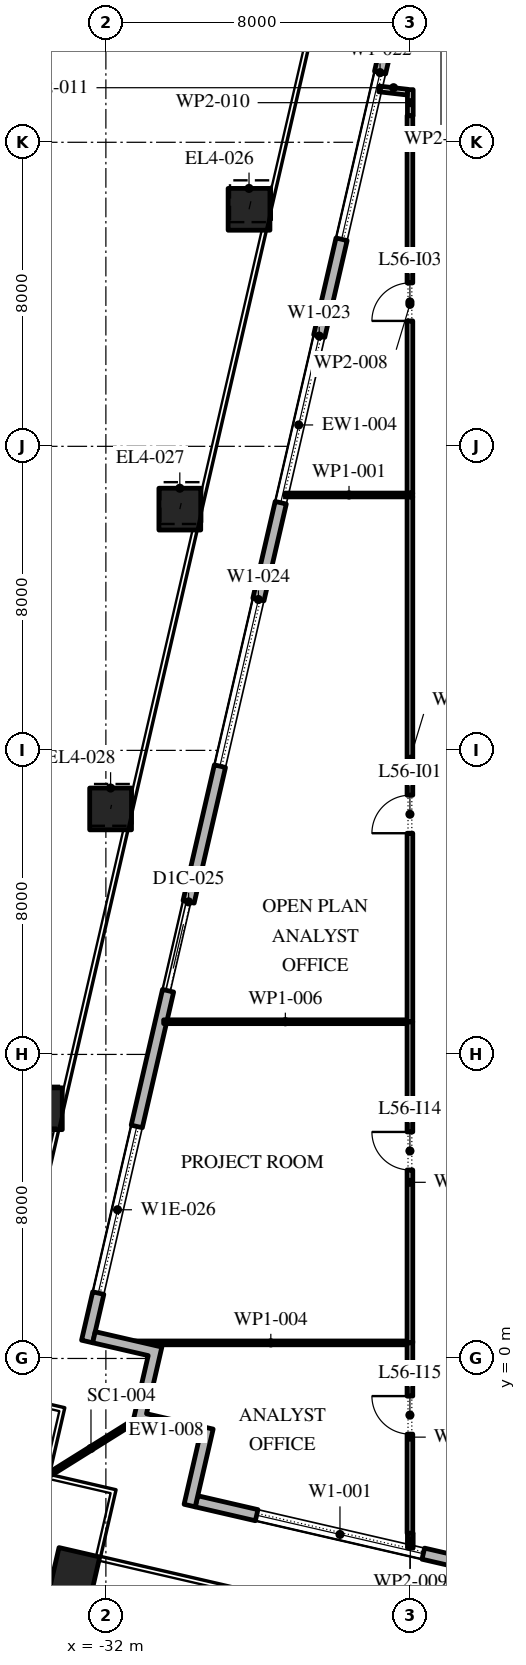
"""IFC4 building model, lengths in metres.
Left out: names, types, materials, properties, quantities, classifications, styles, units other than length and angle.
Written with IfcOpenShell. Run it as: python <this file> out.ifc"""

import sys

from ifc_helpers import new_model, si_unit, direction, frame, frame_2d, origin, origin_2d, place, context, subcontext, project, spatial, polyline, rectangle, outline, extrude, element, fill, save


model = new_model("IFC4")
c1 = context("Model", 3, precision=1e-05, world=origin(), true_north=direction((0.0, 1.0)))
c2 = subcontext(c1, "Body", "Model", "MODEL_VIEW")
j1 = project(units=[si_unit("LENGTHUNIT", "METRE"), si_unit("PLANEANGLEUNIT", "RADIAN")], contexts=[c1])
p1 = place(None, origin())
s1 = spatial("IfcSite", under=j1, at=p1, CompositionType="ELEMENT")
p2 = place(p1, origin())
s2 = spatial("IfcBuilding", under=s1, at=p2, CompositionType="ELEMENT")
p3 = place(p2, frame((0.0, 0.0, 259.8)))
s3 = spatial("IfcBuildingStorey", under=s2, at=p3, CompositionType="ELEMENT", Elevation=259.8)
p4 = place(p3, frame((-32.821, -5.635, 0.0), z_axis=(0.0, 0.0, 1.0), x_axis=(0.974370064785, -0.224951054344, 0.0)))
e1 = element("IfcColumn", 1, at=p4, inside=s3, PredefinedType="COLUMN", context=c2, shape_type="SweptSolid", body=[
    extrude(rectangle(XDim=1.1, YDim=1.1, at=origin_2d()), origin(), (0.0, 0.0, 1.0), 4.2),
])
p5 = place(p3, frame((-28.233, 30.236, 0.0), z_axis=(0.011668267153, 0.050562490995, 0.998652735462), x_axis=(-0.974391195695, 0.224859506699, 0.0)))
e2 = element("IfcColumn", 2, at=p5, inside=s3, PredefinedType="COLUMN", context=c2, shape_type="SweptSolid", body=[
    extrude(rectangle(XDim=1.1, YDim=1.1, at=origin_2d()), origin(), (0.0, 0.0, 1.0), 4.206),
])
p6 = place(p3, frame((-30.055, 22.348, 0.0), z_axis=(0.008770904004, 0.037871717951, 0.999244116431), x_axis=(-0.974214614928, 0.225623323396, 0.0)))
e3 = element("IfcColumn", 3, at=p6, inside=s3, PredefinedType="COLUMN", context=c2, shape_type="SweptSolid", body=[
    extrude(rectangle(XDim=1.1, YDim=1.1, at=origin_2d()), origin(), (0.0, 0.0, 1.0), 4.203),
])
p7 = place(p3, frame((-31.876, 14.459, 0.0), z_axis=(0.005869091843, 0.025277771797, 0.999663237302), x_axis=(-0.974088391429, 0.226167649504, 0.0)))
e4 = element("IfcColumn", 4, at=p7, inside=s3, PredefinedType="COLUMN", context=c2, shape_type="SweptSolid", body=[
    extrude(rectangle(XDim=1.1, YDim=1.1, at=origin_2d()), origin(), (0.0, 0.0, 1.0), 4.201),
])
p8 = place(p3, frame((-33.697, 6.571, 0.0), z_axis=(0.002964348167, 0.012671135303, 0.9999153239), x_axis=(-0.973709261374, 0.227794368487, 0.0)))
e5 = element("IfcColumn", 5, at=p8, inside=s3, PredefinedType="COLUMN", context=c2, shape_type="SweptSolid", body=[
    extrude(rectangle(XDim=1.1, YDim=1.1, at=origin_2d()), origin(), (0.0, 0.0, 1.0), 4.2),
])
p9 = place(p3, frame((-29.616, -3.758, 0.0), z_axis=(0.0, 0.0, 1.0), x_axis=(0.974370532314, -0.224949029246, 0.0)))
e6 = element("IfcWall", 6, at=p9, inside=s3, PredefinedType="STANDARD", context=c2, shape_type="SweptSolid", body=[
    extrude(rectangle(XDim=48.0, YDim=0.3, at=frame_2d((24.0, 0.0))), origin(), (0.0, 0.0, 1.0), 4.0),
])
p10 = place(p9, frame((1.625, 0.0, 0.45)))
e7 = element("IfcOpeningElement", 7, at=p10, cuts=e6, PredefinedType="OPENING", context=c2, shape_type="SweptSolid", body=[
    extrude(rectangle(XDim=4.5, YDim=3.05, at=frame_2d((2.25, 1.525))), frame((0.0, 0.16, 0.0), z_axis=(0.0, -1.0, 0.0), x_axis=(1.0, 0.0, 0.0)), (0.0, 0.0, 1.0), 0.32),
])
p11 = place(p9, frame((10.575, 0.0, 0.0)))
e8 = element("IfcOpeningElement", 8, at=p11, cuts=e6, PredefinedType="OPENING", context=c2, shape_type="SweptSolid", body=[
    extrude(rectangle(XDim=2.4, YDim=3.5, at=frame_2d((1.2, 1.75))), frame((0.0, 0.16, 0.0), z_axis=(0.0, -1.0, 0.0), x_axis=(1.0, 0.0, 0.0)), (0.0, 0.0, 1.0), 0.32),
])
p12 = place(p9, frame((17.575, 0.0, 0.45)))
e9 = element("IfcOpeningElement", 9, at=p12, cuts=e6, PredefinedType="OPENING", context=c2, shape_type="SweptSolid", body=[
    extrude(rectangle(XDim=4.5, YDim=3.0, at=frame_2d((2.25, 1.5))), frame((0.0, 0.16, 0.0), z_axis=(0.0, -1.0, 0.0), x_axis=(1.0, 0.0, 0.0)), (0.0, 0.0, 1.0), 0.32),
])
p13 = place(p9, frame((25.625, 0.0, 0.45)))
e10 = element("IfcOpeningElement", 10, at=p13, cuts=e6, PredefinedType="OPENING", context=c2, shape_type="SweptSolid", body=[
    extrude(rectangle(XDim=4.5, YDim=2.95, at=frame_2d((2.25, 1.475))), frame((0.0, 0.16, 0.0), z_axis=(0.0, -1.0, 0.0), x_axis=(1.0, 0.0, 0.0)), (0.0, 0.0, 1.0), 0.32),
])
p14 = place(p9, frame((33.675, 0.0, 0.45)))
e11 = element("IfcOpeningElement", 11, at=p14, cuts=e6, PredefinedType="OPENING", context=c2, shape_type="SweptSolid", body=[
    extrude(rectangle(XDim=4.5, YDim=2.825, at=frame_2d((2.25, 1.413))), frame((0.0, 0.16, 0.0), z_axis=(0.0, -1.0, 0.0), x_axis=(1.0, 0.0, 0.0)), (0.0, 0.0, 1.0), 0.32),
])
p15 = place(p9, frame((42.775, 0.0, 0.0)))
e12 = element("IfcOpeningElement", 12, at=p15, cuts=e6, PredefinedType="OPENING", context=c2, shape_type="SweptSolid", body=[
    extrude(rectangle(XDim=2.4, YDim=3.5, at=frame_2d((1.2, 1.75))), frame((0.0, 0.16, 0.0), z_axis=(0.0, -1.0, 0.0), x_axis=(1.0, 0.0, 0.0)), (0.0, 0.0, 1.0), 0.32),
])
p16 = place(p3, frame((-21.359, 48.678, 0.0), z_axis=(0.0, 0.0, 1.0), x_axis=(-0.224949198343, -0.974370493275, 0.0)))
e13 = element("IfcWall", 13, at=p16, inside=s3, PredefinedType="STANDARD", context=c2, shape_type="SweptSolid", body=[
    extrude(rectangle(XDim=49.5, YDim=0.3, at=frame_2d((24.75, 0.0))), origin(), (0.0, 0.0, 1.0), 4.0),
])
p17 = place(p16, frame((1.157, 0.0, 0.45)))
e14 = element("IfcOpeningElement", 14, at=p17, cuts=e13, PredefinedType="OPENING", context=c2, shape_type="SweptSolid", body=[
    extrude(rectangle(XDim=4.5, YDim=3.05, at=frame_2d((2.25, 1.525))), frame((0.0, 0.16, 0.0), z_axis=(0.0, -1.0, 0.0), x_axis=(1.0, 0.0, 0.0)), (0.0, 0.0, 1.0), 0.32),
])
p18 = place(p16, frame((9.171, 0.0, 0.0)))
e15 = element("IfcOpeningElement", 15, at=p18, cuts=e13, PredefinedType="OPENING", context=c2, shape_type="SweptSolid", body=[
    extrude(rectangle(XDim=2.4, YDim=3.5, at=frame_2d((1.2, 1.75))), frame((0.0, 0.16, 0.0), z_axis=(0.0, -1.0, 0.0), x_axis=(1.0, 0.0, 0.0)), (0.0, 0.0, 1.0), 0.32),
])
p19 = place(p16, frame((15.236, 0.0, 0.45)))
e16 = element("IfcOpeningElement", 16, at=p19, cuts=e13, PredefinedType="OPENING", context=c2, shape_type="SweptSolid", body=[
    extrude(rectangle(XDim=4.5, YDim=3.05, at=frame_2d((2.25, 1.525))), frame((0.0, 0.16, 0.0), z_axis=(0.0, -1.0, 0.0), x_axis=(1.0, 0.0, 0.0)), (0.0, 0.0, 1.0), 0.32),
])
p20 = place(p16, frame((22.35, 0.0, 0.45)))
e17 = element("IfcOpeningElement", 17, at=p20, cuts=e13, PredefinedType="OPENING", context=c2, shape_type="SweptSolid", body=[
    extrude(rectangle(XDim=4.5, YDim=3.05, at=frame_2d((2.25, 1.525))), frame((0.0, 0.16, 0.0), z_axis=(0.0, -1.0, 0.0), x_axis=(1.0, 0.0, 0.0)), (0.0, 0.0, 1.0), 0.32),
])
p21 = place(p16, frame((29.464, 0.0, 0.45)))
e18 = element("IfcOpeningElement", 18, at=p21, cuts=e13, PredefinedType="OPENING", context=c2, shape_type="SweptSolid", body=[
    extrude(rectangle(XDim=4.5, YDim=3.05, at=frame_2d((2.25, 1.525))), frame((0.0, 0.16, 0.0), z_axis=(0.0, -1.0, 0.0), x_axis=(1.0, 0.0, 0.0)), (0.0, 0.0, 1.0), 0.32),
])
p22 = place(p16, frame((37.628, 0.0, 0.0)))
e19 = element("IfcOpeningElement", 19, at=p22, cuts=e13, PredefinedType="OPENING", context=c2, shape_type="SweptSolid", body=[
    extrude(rectangle(XDim=2.4, YDim=3.325, at=frame_2d((1.2, 1.663))), frame((0.0, 0.16, 0.0), z_axis=(0.0, -1.0, 0.0), x_axis=(1.0, 0.0, 0.0)), (0.0, 0.0, 1.0), 0.32),
])
p23 = place(p16, frame((43.693, 0.0, 0.45)))
e20 = element("IfcOpeningElement", 20, at=p23, cuts=e13, PredefinedType="OPENING", context=c2, shape_type="SweptSolid", body=[
    extrude(rectangle(XDim=4.5, YDim=2.825, at=frame_2d((2.25, 1.413))), frame((0.0, 0.16, 0.0), z_axis=(0.0, -1.0, 0.0), x_axis=(1.0, 0.0, 0.0)), (0.0, 0.0, 1.0), 0.32),
])
p24 = place(p3, origin())
e21 = element("IfcWall", 21, at=p24, inside=s3, PredefinedType="STANDARD", context=c2, shape_type="SweptSolid", body=[
    extrude(outline(polyline([(-31.291, -1.678), (-30.886, 0.076), (-32.348, 0.413), (-32.28, 0.705), (-30.526, 0.301), (-30.931, -1.453), (-29.177, -1.858), (-29.65, -3.905), (-29.942, -3.837), (-29.537, -2.083), (-31.291, -1.678)])), origin(), (0.0, 0.0, 1.0), 4.0),
])
p25 = place(p3, frame((-31.291, -1.678, -0.05), z_axis=(0.0, 0.0, 1.0), x_axis=(-0.84807753525, -0.529872148923, 0.0)))
e22 = element("IfcWall", 22, at=p25, inside=s3, PredefinedType="STANDARD", context=c2, shape_type="SweptSolid", body=[
    extrude(rectangle(XDim=2.596, YDim=0.1, at=frame_2d((1.298, 0.0))), origin(), (0.0, 0.0, 1.0), 4.05),
])
p26 = place(p3, frame((-27.28, 22.72, 0.0), z_axis=(0.0, 0.0, 1.0), x_axis=(1.0, 0.0, 0.0)))
e23 = element("IfcWall", 23, at=p26, inside=s3, PredefinedType="PARTITIONING", context=c2, shape_type="SweptSolid", body=[
    extrude(rectangle(XDim=3.355, YDim=0.1, at=frame_2d((1.677, 0.0))), origin(), (0.0, 0.0, 1.0), 4.0),
])
p27 = place(p3, frame((-24.0, -4.6, 0.0), z_axis=(0.0, 0.0, 1.0), x_axis=(0.0, 1.0, 0.0)))
e24 = element("IfcWall", 24, at=p27, inside=s3, PredefinedType="PARTITIONING", context=c2, shape_type="SweptSolid", body=[
    extrude(rectangle(XDim=5.06, YDim=0.15, at=frame_2d((2.53, 0.0))), origin(), (0.0, 0.0, 1.0), 4.0),
])
p28 = place(p27, frame((2.61, 0.0, 0.0)))
e25 = element("IfcOpeningElement", 25, at=p28, cuts=e24, PredefinedType="OPENING", context=c2, shape_type="SweptSolid", body=[
    extrude(rectangle(XDim=1.0, YDim=2.1, at=frame_2d((0.5, 1.05))), frame((0.0, 0.085, 0.0), z_axis=(0.0, -1.0, 0.0), x_axis=(1.0, 0.0, 0.0)), (0.0, 0.0, 1.0), 0.17),
])
p29 = place(p3, frame((-24.075, 0.41, 0.0), z_axis=(0.0, 0.0, 1.0), x_axis=(-1.0, 0.0, 0.0)))
e26 = element("IfcWall", 26, at=p29, inside=s3, PredefinedType="PARTITIONING", context=c2, shape_type="SweptSolid", body=[
    extrude(rectangle(XDim=7.17, YDim=0.1, at=frame_2d((3.585, 0.0))), origin(), (0.0, 0.0, 1.0), 4.0),
])
p30 = place(p3, frame((-24.0, 0.41, 0.0), z_axis=(0.0, 0.0, 1.0), x_axis=(0.0, 1.0, 0.0)))
e27 = element("IfcWall", 27, at=p30, inside=s3, PredefinedType="PARTITIONING", context=c2, shape_type="SweptSolid", body=[
    extrude(rectangle(XDim=8.45, YDim=0.15, at=frame_2d((4.225, 0.0))), origin(), (0.0, 0.0, 1.0), 4.0),
])
p31 = place(p30, frame((4.55, 0.0, 0.0)))
e28 = element("IfcOpeningElement", 28, at=p31, cuts=e27, PredefinedType="OPENING", context=c2, shape_type="SweptSolid", body=[
    extrude(rectangle(XDim=1.0, YDim=2.1, at=frame_2d((0.5, 1.05))), frame((0.0, 0.085, 0.0), z_axis=(0.0, -1.0, 0.0), x_axis=(1.0, 0.0, 0.0)), (0.0, 0.0, 1.0), 0.17),
])
p32 = place(p3, frame((-24.075, 8.86, 0.0), z_axis=(0.0, 0.0, 1.0), x_axis=(-1.0, 0.0, 0.0)))
e29 = element("IfcWall", 29, at=p32, inside=s3, PredefinedType="PARTITIONING", context=c2, shape_type="SweptSolid", body=[
    extrude(rectangle(XDim=6.405, YDim=0.1, at=frame_2d((3.203, 0.0))), origin(), (0.0, 0.0, 1.0), 4.0),
])
p33 = place(p3, frame((-24.0, 8.86, 0.0), z_axis=(0.0, 0.0, 1.0), x_axis=(0.0, 1.0, 0.0)))
e30 = element("IfcWall", 30, at=p33, inside=s3, PredefinedType="PARTITIONING", context=c2, shape_type="SweptSolid", body=[
    extrude(rectangle(XDim=13.81, YDim=0.15, at=frame_2d((6.905, 0.0))), origin(), (0.0, 0.0, 1.0), 4.0),
])
p34 = place(p33, frame((4.96, 0.0, 0.0)))
e31 = element("IfcOpeningElement", 31, at=p34, cuts=e30, PredefinedType="OPENING", context=c2, shape_type="SweptSolid", body=[
    extrude(rectangle(XDim=1.0, YDim=2.1, at=frame_2d((0.5, 1.05))), frame((0.0, 0.085, 0.0), z_axis=(0.0, -1.0, 0.0), x_axis=(1.0, 0.0, 0.0)), (0.0, 0.0, 1.0), 0.17),
])
p35 = place(p3, frame((-24.0, 22.77, 0.0), z_axis=(0.0, 0.0, 1.0), x_axis=(0.0, 1.0, 0.0)))
e32 = element("IfcWall", 32, at=p35, inside=s3, PredefinedType="PARTITIONING", context=c2, shape_type="SweptSolid", body=[
    extrude(rectangle(XDim=9.93, YDim=0.15, at=frame_2d((4.965, 0.0))), origin(), (0.0, 0.0, 1.0), 4.0),
])
p36 = place(p35, frame((4.53, 0.0, 0.0)))
e33 = element("IfcOpeningElement", 33, at=p36, cuts=e32, PredefinedType="OPENING", context=c2, shape_type="SweptSolid", body=[
    extrude(rectangle(XDim=1.0, YDim=2.1, at=frame_2d((0.5, 1.05))), frame((0.0, 0.085, 0.0), z_axis=(0.0, -1.0, 0.0), x_axis=(1.0, 0.0, 0.0)), (0.0, 0.0, 1.0), 0.17),
])
p37 = place(p3, frame((-23.99, -4.986, 0.0), z_axis=(0.0, 0.0, 1.0), x_axis=(0.0, 1.0, 0.0)))
e34 = element("IfcWall", 34, at=p37, inside=s3, PredefinedType="PARTITIONING", context=c2, shape_type="SweptSolid", body=[
    extrude(rectangle(XDim=0.386, YDim=0.15, at=frame_2d((0.193, 0.0))), origin(), (0.0, 0.0, 1.0), 4.0),
])
p38 = place(p3, frame((-23.99, 32.7, 0.0), z_axis=(0.0, 0.0, 1.0), x_axis=(0.0, 1.0, 0.0)))
e35 = element("IfcWall", 35, at=p38, inside=s3, PredefinedType="PARTITIONING", context=c2, shape_type="SweptSolid", body=[
    extrude(rectangle(XDim=0.685, YDim=0.15, at=frame_2d((0.343, 0.0))), origin(), (0.0, 0.0, 1.0), 4.0),
])
p39 = place(p3, frame((-24.065, 33.319, 0.0), z_axis=(0.0, 0.0, 1.0), x_axis=(-0.993611867789, 0.112851478456, 0.0)))
e36 = element("IfcWall", 36, at=p39, inside=s3, PredefinedType="PARTITIONING", context=c2, shape_type="SweptSolid", body=[
    extrude(rectangle(XDim=0.753, YDim=0.15, at=frame_2d((0.376, 0.0))), origin(), (0.0, 0.0, 1.0), 4.0),
])
p40 = place(p10, origin())
e37 = element("IfcWindow", 37, at=p40, inside=s3, PartitioningType="DOUBLE_PANEL_VERTICAL", PredefinedType="WINDOW", context=c2, shape_type="SweptSolid", body=[
    extrude(rectangle(XDim=4.5, YDim=3.05, at=frame_2d((2.25, 1.525))), frame((0.0, 0.03, 0.0), z_axis=(0.0, -1.0, 0.0), x_axis=(1.0, 0.0, 0.0)), (0.0, 0.0, 1.0), 0.06),
])
fill(e7, e37)
p41 = place(p19, origin())
e38 = element("IfcWindow", 38, at=p41, inside=s3, PartitioningType="DOUBLE_PANEL_VERTICAL", PredefinedType="WINDOW", context=c2, shape_type="SweptSolid", body=[
    extrude(rectangle(XDim=4.5, YDim=3.05, at=frame_2d((2.25, 1.525))), frame((0.0, 0.03, 0.0), z_axis=(0.0, -1.0, 0.0), x_axis=(1.0, 0.0, 0.0)), (0.0, 0.0, 1.0), 0.06),
])
fill(e16, e38)
p42 = place(p20, origin())
e39 = element("IfcWindow", 39, at=p42, inside=s3, PartitioningType="DOUBLE_PANEL_VERTICAL", PredefinedType="WINDOW", context=c2, shape_type="SweptSolid", body=[
    extrude(rectangle(XDim=4.5, YDim=3.05, at=frame_2d((2.25, 1.525))), frame((0.0, 0.03, 0.0), z_axis=(0.0, -1.0, 0.0), x_axis=(1.0, 0.0, 0.0)), (0.0, 0.0, 1.0), 0.06),
])
fill(e17, e39)
p43 = place(p21, origin())
e40 = element("IfcWindow", 40, at=p43, inside=s3, PartitioningType="DOUBLE_PANEL_VERTICAL", PredefinedType="WINDOW", context=c2, shape_type="SweptSolid", body=[
    extrude(rectangle(XDim=4.5, YDim=3.05, at=frame_2d((2.25, 1.525))), frame((0.0, 0.03, 0.0), z_axis=(0.0, -1.0, 0.0), x_axis=(1.0, 0.0, 0.0)), (0.0, 0.0, 1.0), 0.06),
])
fill(e18, e40)
p44 = place(p22, origin())
e41 = element("IfcDoor", 41, at=p44, inside=s3, OperationType="DOUBLE_DOOR_SLIDING", PredefinedType="DOOR", context=c2, shape_type="SweptSolid", body=[
    extrude(rectangle(XDim=2.4, YDim=3.325, at=frame_2d((1.2, 1.663))), frame((0.0, 0.025, 0.0), z_axis=(0.0, -1.0, 0.0), x_axis=(1.0, 0.0, 0.0)), (0.0, 0.0, 1.0), 0.05),
])
fill(e19, e41)
p45 = place(p23, origin())
e42 = element("IfcWindow", 42, at=p45, inside=s3, PartitioningType="DOUBLE_PANEL_VERTICAL", PredefinedType="WINDOW", context=c2, shape_type="SweptSolid", body=[
    extrude(rectangle(XDim=4.5, YDim=2.825, at=frame_2d((2.25, 1.413))), frame((0.0, 0.03, 0.0), z_axis=(0.0, -1.0, 0.0), x_axis=(1.0, 0.0, 0.0)), (0.0, 0.0, 1.0), 0.06),
])
fill(e20, e42)
p46 = place(p34, origin())
e43 = element("IfcDoor", 43, at=p46, inside=s3, OperationType="SINGLE_SWING_RIGHT", PredefinedType="DOOR", context=c2, shape_type="SweptSolid", body=[
    extrude(rectangle(XDim=1.0, YDim=2.1, at=frame_2d((0.5, 1.05))), frame((0.0, 0.025, 0.0), z_axis=(0.0, -1.0, 0.0), x_axis=(1.0, 0.0, 0.0)), (0.0, 0.0, 1.0), 0.05),
])
fill(e31, e43)
p47 = place(p36, origin())
e44 = element("IfcDoor", 44, at=p47, inside=s3, OperationType="SINGLE_SWING_RIGHT", PredefinedType="DOOR", context=c2, shape_type="SweptSolid", body=[
    extrude(rectangle(XDim=1.0, YDim=2.1, at=frame_2d((0.5, 1.05))), frame((0.0, 0.025, 0.0), z_axis=(0.0, -1.0, 0.0), x_axis=(1.0, 0.0, 0.0)), (0.0, 0.0, 1.0), 0.05),
])
fill(e33, e44)
p48 = place(p31, origin())
e45 = element("IfcDoor", 45, at=p48, inside=s3, OperationType="SINGLE_SWING_LEFT", PredefinedType="DOOR", context=c2, shape_type="SweptSolid", body=[
    extrude(rectangle(XDim=1.0, YDim=2.1, at=frame_2d((0.5, 1.05))), frame((0.0, 0.025, 0.0), z_axis=(0.0, -1.0, 0.0), x_axis=(1.0, 0.0, 0.0)), (0.0, 0.0, 1.0), 0.05),
])
fill(e28, e45)
p49 = place(p28, origin())
e46 = element("IfcDoor", 46, at=p49, inside=s3, OperationType="SINGLE_SWING_LEFT", PredefinedType="DOOR", context=c2, shape_type="SweptSolid", body=[
    extrude(rectangle(XDim=1.0, YDim=2.1, at=frame_2d((0.5, 1.05))), frame((0.0, 0.025, 0.0), z_axis=(0.0, -1.0, 0.0), x_axis=(1.0, 0.0, 0.0)), (0.0, 0.0, 1.0), 0.05),
])
fill(e25, e46)
save(model, sys.argv[1])
